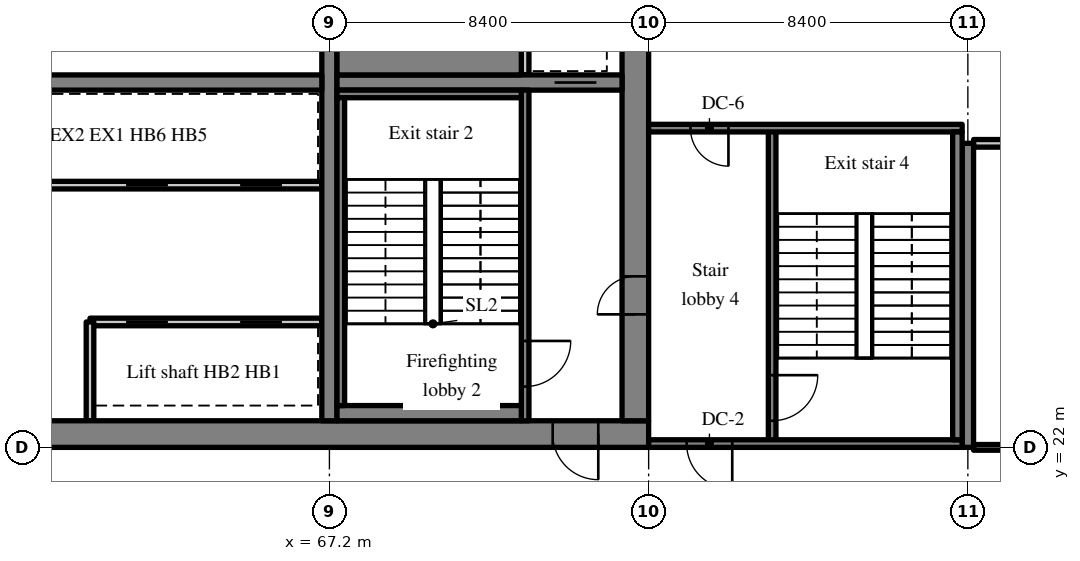
"""IFC4 building model, lengths in metres.
Left out: names, types, materials, properties, quantities, classifications, styles, units other than length and angle.
Written with IfcOpenShell. Run it as: python <this file> out.ifc"""

import sys

from ifc_helpers import new_model, si_unit, direction, frame, frame_2d, origin, place, context, subcontext, project, spatial, rectangle, extrude, source, transform, mapped, element, fill, save


model = new_model("IFC4")
c1 = context("Model", 3, precision=1e-05, world=origin(), true_north=direction((0.0, 1.0)))
c2 = subcontext(c1, "Body", "Model", "MODEL_VIEW")
j1 = project(units=[si_unit("LENGTHUNIT", "METRE"), si_unit("PLANEANGLEUNIT", "RADIAN")], contexts=[c1])
p1 = place(None, origin())
s1 = spatial("IfcSite", under=j1, at=p1, CompositionType="ELEMENT")
p2 = place(p1, origin())
s2 = spatial("IfcBuilding", under=s1, at=p2, CompositionType="ELEMENT")
p3 = place(p2, frame((0.0, 0.0, 155.4)))
s3 = spatial("IfcBuildingStorey", under=s2, at=p3, CompositionType="ELEMENT", Elevation=155.4)
m1 = source(origin(), c2, "Body", "SweptSolid", [
    extrude(rectangle(XDim=50.4, YDim=0.7, at=frame_2d((25.2, 0.0))), origin(), (0.0, 0.0, 1.0), 3.52),
])
p4 = place(p3, frame((25.2, 22.35, 0.0), z_axis=(0.0, 0.0, 1.0), x_axis=(1.0, 0.0, 0.0)))
e1 = element("IfcWall", 1, at=p4, inside=s3, PredefinedType="SHEAR", context=c2, shape_type="MappedRepresentation", body=[
    mapped(m1, transform((0.0, 0.0, 0.0), scale=1.0)),
])
m2 = source(origin(), c2, "Body", "SweptSolid", [
    extrude(rectangle(XDim=1.8, YDim=2.1, at=frame_2d((0.9, 1.05))), frame((0.0, 0.36, 0.0), z_axis=(0.0, -1.0, 0.0), x_axis=(1.0, 0.0, 0.0)), (0.0, 0.0, 1.0), 0.72),
])
p5 = place(p4, frame((15.9, 0.0, 0.0)))
e2 = element("IfcOpeningElement", 2, at=p5, cuts=e1, PredefinedType="OPENING", context=c2, shape_type="MappedRepresentation", body=[
    mapped(m2, transform((0.0, 0.0, 0.0), scale=1.0)),
])
m3 = source(origin(), c2, "Body", "SweptSolid", [
    extrude(rectangle(XDim=0.9, YDim=2.1, at=frame_2d((0.45, 1.05))), frame((0.0, 0.36, 0.0), z_axis=(0.0, -1.0, 0.0), x_axis=(1.0, 0.0, 0.0)), (0.0, 0.0, 1.0), 0.72),
])
p6 = place(p4, frame((21.5, 0.0, 0.0)))
e3 = element("IfcOpeningElement", 3, at=p6, cuts=e1, PredefinedType="OPENING", context=c2, shape_type="MappedRepresentation", body=[
    mapped(m3, transform((0.0, 0.0, 0.0), scale=1.0)),
])
p7 = place(p4, frame((32.7, 0.0, 0.0)))
e4 = element("IfcOpeningElement", 4, at=p7, cuts=e1, PredefinedType="OPENING", context=c2, shape_type="MappedRepresentation", body=[
    mapped(m2, transform((0.0, 0.0, 0.0), scale=1.0)),
])
m4 = source(origin(), c2, "Body", "SweptSolid", [
    extrude(rectangle(XDim=1.2, YDim=2.1, at=frame_2d((0.6, 1.05))), frame((0.0, 0.36, 0.0), z_axis=(0.0, -1.0, 0.0), x_axis=(1.0, 0.0, 0.0)), (0.0, 0.0, 1.0), 0.72),
])
p8 = place(p4, frame((6.475, 0.0, 0.0)))
e5 = element("IfcOpeningElement", 5, at=p8, cuts=e1, PredefinedType="OPENING", context=c2, shape_type="MappedRepresentation", body=[
    mapped(m4, transform((0.0, 0.0, 0.0), scale=1.0)),
])
p9 = place(p4, frame((47.875, 0.0, 0.0)))
e6 = element("IfcOpeningElement", 6, at=p9, cuts=e1, PredefinedType="OPENING", context=c2, shape_type="MappedRepresentation", body=[
    mapped(m4, transform((0.0, 0.0, 0.0), scale=1.0)),
])
m5 = source(origin(), c2, "Body", "SweptSolid", [
    extrude(rectangle(XDim=18.6, YDim=0.7, at=frame_2d((9.3, 0.0))), origin(), (0.0, 0.0, 1.0), 3.52),
])
p10 = place(p3, frame((75.25, 22.7, 0.0), z_axis=(0.0, 0.0, 1.0), x_axis=(0.0, 1.0, 0.0)))
e7 = element("IfcWall", 7, at=p10, inside=s3, PredefinedType="SHEAR", context=c2, shape_type="MappedRepresentation", body=[
    mapped(m5, transform((0.0, 0.0, 0.0), scale=1.0)),
])
m6 = source(origin(), c2, "Body", "SweptSolid", [
    extrude(rectangle(XDim=1.0, YDim=2.1, at=frame_2d((0.5, 1.05))), frame((0.0, 0.36, 0.0), z_axis=(0.0, -1.0, 0.0), x_axis=(1.0, 0.0, 0.0)), (0.0, 0.0, 1.0), 0.72),
])
p11 = place(p10, frame((2.8, 0.0, 0.0)))
e8 = element("IfcOpeningElement", 8, at=p11, cuts=e7, PredefinedType="OPENING", context=c2, shape_type="MappedRepresentation", body=[
    mapped(m6, transform((0.0, 0.0, 0.0), scale=1.0)),
])
p12 = place(p10, frame((12.7, 0.0, 0.0)))
e9 = element("IfcOpeningElement", 9, at=p12, cuts=e7, PredefinedType="OPENING", context=c2, shape_type="MappedRepresentation", body=[
    mapped(m4, transform((0.0, 0.0, 0.0), scale=1.0)),
])
m7 = source(origin(), c2, "Body", "SweptSolid", [
    extrude(rectangle(XDim=18.6, YDim=0.4, at=frame_2d((9.3, 0.0))), origin(), (0.0, 0.0, 1.0), 3.52),
])
p13 = place(p3, frame((67.2, 22.7, 0.0), z_axis=(0.0, 0.0, 1.0), x_axis=(0.0, 1.0, 0.0)))
e10 = element("IfcWall", 10, at=p13, inside=s3, PredefinedType="SHEAR", context=c2, shape_type="MappedRepresentation", body=[
    mapped(m7, transform((0.0, 0.0, 0.0), scale=1.0)),
])
m8 = source(origin(), c2, "Body", "SweptSolid", [
    extrude(rectangle(XDim=16.4, YDim=0.4, at=frame_2d((8.2, 0.0))), origin(), (0.0, 0.0, 1.0), 3.52),
])
p14 = place(p3, frame((50.6, 31.6, 0.0), z_axis=(0.0, 0.0, 1.0), x_axis=(1.0, 0.0, 0.0)))
e11 = element("IfcWall", 11, at=p14, inside=s3, PredefinedType="SHEAR", context=c2, shape_type="MappedRepresentation", body=[
    mapped(m8, transform((0.0, 0.0, 0.0), scale=1.0)),
])
m9 = source(origin(), c2, "Body", "SweptSolid", [
    extrude(rectangle(XDim=1.0, YDim=2.1, at=frame_2d((0.5, 1.05))), frame((0.0, 0.21, 0.0), z_axis=(0.0, -1.0, 0.0), x_axis=(1.0, 0.0, 0.0)), (0.0, 0.0, 1.0), 0.42),
])
p15 = place(p14, frame((0.6, 0.0, 0.0)))
e12 = element("IfcOpeningElement", 12, at=p15, cuts=e11, PredefinedType="OPENING", context=c2, shape_type="MappedRepresentation", body=[
    mapped(m9, transform((0.0, 0.0, 0.0), scale=1.0)),
])
m10 = source(origin(), c2, "Body", "SweptSolid", [
    extrude(rectangle(XDim=7.5, YDim=0.4, at=frame_2d((3.75, 0.0))), origin(), (0.0, 0.0, 1.0), 3.52),
])
p16 = place(p3, frame((67.4, 31.6, 0.0), z_axis=(0.0, 0.0, 1.0), x_axis=(1.0, 0.0, 0.0)))
e13 = element("IfcWall", 13, at=p16, inside=s3, PredefinedType="SHEAR", context=c2, shape_type="MappedRepresentation", body=[
    mapped(m10, transform((0.0, 0.0, 0.0), scale=1.0)),
])
m11 = source(origin(), c2, "Body", "SweptSolid", [
    extrude(rectangle(XDim=1.1, YDim=2.1, at=frame_2d((0.55, 1.05))), frame((0.0, 0.21, 0.0), z_axis=(0.0, -1.0, 0.0), x_axis=(1.0, 0.0, 0.0)), (0.0, 0.0, 1.0), 0.42),
])
p17 = place(p16, frame((5.725, 0.0, 0.0)))
e14 = element("IfcOpeningElement", 14, at=p17, cuts=e13, PredefinedType="OPENING", context=c2, shape_type="MappedRepresentation", body=[
    mapped(m11, transform((0.0, 0.0, 0.0), scale=1.0)),
])
m12 = source(origin(), c2, "Body", "SweptSolid", [
    extrude(rectangle(XDim=8.0, YDim=0.3, at=frame_2d((4.0, 0.0))), origin(), (0.0, 0.0, 1.0), 3.52),
])
p18 = place(p3, frame((84.0, 22.0, 0.0), z_axis=(0.0, 0.0, 1.0), x_axis=(0.0, 1.0, 0.0)))
e15 = element("IfcWall", 15, at=p18, inside=s3, PredefinedType="SHEAR", context=c2, shape_type="MappedRepresentation", body=[
    mapped(m12, transform((0.0, 0.0, 0.0), scale=1.0)),
])
m13 = source(origin(), c2, "Body", "SweptSolid", [
    extrude(rectangle(XDim=6.1, YDim=0.2, at=frame_2d((3.05, 0.0))), origin(), (0.0, 0.0, 1.0), 3.52),
])
p19 = place(p3, frame((67.0, 25.3, 0.0), z_axis=(0.0, 0.0, 1.0), x_axis=(-1.0, 0.0, 0.0)))
e16 = element("IfcWall", 16, at=p19, inside=s3, PredefinedType="SOLIDWALL", context=c2, shape_type="MappedRepresentation", body=[
    mapped(m13, transform((0.0, 0.0, 0.0), scale=1.0)),
])
m14 = source(origin(), c2, "Body", "SweptSolid", [
    extrude(rectangle(XDim=1.1, YDim=2.1, at=frame_2d((0.55, 1.05))), frame((0.0, 0.11, 0.0), z_axis=(0.0, -1.0, 0.0), x_axis=(1.0, 0.0, 0.0)), (0.0, 0.0, 1.0), 0.22),
])
p20 = place(p19, frame((1.05, 0.0, 0.0)))
e17 = element("IfcOpeningElement", 17, at=p20, cuts=e16, PredefinedType="OPENING", context=c2, shape_type="MappedRepresentation", body=[
    mapped(m14, transform((0.0, 0.0, 0.0), scale=1.0)),
])
p21 = place(p19, frame((4.05, 0.0, 0.0)))
e18 = element("IfcOpeningElement", 18, at=p21, cuts=e16, PredefinedType="OPENING", context=c2, shape_type="MappedRepresentation", body=[
    mapped(m14, transform((0.0, 0.0, 0.0), scale=1.0)),
])
m15 = source(origin(), c2, "Body", "SweptSolid", [
    extrude(rectangle(XDim=12.1, YDim=0.2, at=frame_2d((6.05, 0.0))), origin(), (0.0, 0.0, 1.0), 3.52),
])
p22 = place(p3, frame((67.0, 28.9, 0.0), z_axis=(0.0, 0.0, 1.0), x_axis=(-1.0, 0.0, 0.0)))
e19 = element("IfcWall", 19, at=p22, inside=s3, PredefinedType="SOLIDWALL", context=c2, shape_type="MappedRepresentation", body=[
    mapped(m15, transform((0.0, 0.0, 0.0), scale=1.0)),
])
p23 = place(p22, frame((1.05, 0.0, 0.0)))
e20 = element("IfcOpeningElement", 20, at=p23, cuts=e19, PredefinedType="OPENING", context=c2, shape_type="MappedRepresentation", body=[
    mapped(m14, transform((0.0, 0.0, 0.0), scale=1.0)),
])
p24 = place(p22, frame((4.05, 0.0, 0.0)))
e21 = element("IfcOpeningElement", 21, at=p24, cuts=e19, PredefinedType="OPENING", context=c2, shape_type="MappedRepresentation", body=[
    mapped(m14, transform((0.0, 0.0, 0.0), scale=1.0)),
])
m16 = source(origin(), c2, "Body", "SweptSolid", [
    extrude(rectangle(XDim=2.6, YDim=0.2, at=frame_2d((1.3, 0.0))), origin(), (0.0, 0.0, 1.0), 3.52),
])
p25 = place(p3, frame((60.9, 22.7, 0.0), z_axis=(0.0, 0.0, 1.0), x_axis=(0.0, 1.0, 0.0)))
e22 = element("IfcWall", 22, at=p25, inside=s3, PredefinedType="SOLIDWALL", context=c2, shape_type="MappedRepresentation", body=[
    mapped(m16, transform((0.0, 0.0, 0.0), scale=1.0)),
])
m17 = source(origin(), c2, "Body", "SweptSolid", [
    extrude(rectangle(XDim=8.7, YDim=0.2, at=frame_2d((4.35, 0.0))), origin(), (0.0, 0.0, 1.0), 3.52),
])
p26 = place(p3, frame((72.35, 22.7, 0.0), z_axis=(0.0, 0.0, 1.0), x_axis=(0.0, 1.0, 0.0)))
e23 = element("IfcWall", 23, at=p26, inside=s3, PredefinedType="SOLIDWALL", context=c2, shape_type="MappedRepresentation", body=[
    mapped(m17, transform((0.0, 0.0, 0.0), scale=1.0)),
])
m18 = source(origin(), c2, "Body", "SweptSolid", [
    extrude(rectangle(XDim=1.2, YDim=2.1, at=frame_2d((0.6, 1.05))), frame((0.0, 0.11, 0.0), z_axis=(0.0, -1.0, 0.0), x_axis=(1.0, 0.0, 0.0)), (0.0, 0.0, 1.0), 0.22),
])
p27 = place(p26, frame((0.9, 0.0, 0.0)))
e24 = element("IfcOpeningElement", 24, at=p27, cuts=e23, PredefinedType="OPENING", context=c2, shape_type="MappedRepresentation", body=[
    mapped(m18, transform((0.0, 0.0, 0.0), scale=1.0)),
])
m19 = source(origin(), c2, "Body", "SweptSolid", [
    extrude(rectangle(XDim=1.8, YDim=0.2, at=frame_2d((0.9, 0.0))), origin(), (0.0, 0.0, 1.0), 3.52),
])
p28 = place(p3, frame((72.35, 31.8, 0.0), z_axis=(0.0, 0.0, 1.0), x_axis=(0.0, 1.0, 0.0)))
e25 = element("IfcWall", 25, at=p28, inside=s3, PredefinedType="SOLIDWALL", context=c2, shape_type="MappedRepresentation", body=[
    mapped(m19, transform((0.0, 0.0, 0.0), scale=1.0)),
])
m20 = source(origin(), c2, "Body", "SweptSolid", [
    extrude(rectangle(XDim=8.3, YDim=0.2, at=frame_2d((4.15, 0.0))), origin(), (0.0, 0.0, 1.0), 3.52),
])
p29 = place(p3, frame((78.85, 22.1, 0.0), z_axis=(0.0, 0.0, 1.0), x_axis=(0.0, 1.0, 0.0)))
e26 = element("IfcWall", 26, at=p29, inside=s3, PredefinedType="SOLIDWALL", context=c2, shape_type="MappedRepresentation", body=[
    mapped(m20, transform((0.0, 0.0, 0.0), scale=1.0)),
])
p30 = place(p29, frame((0.6, 0.0, 0.0)))
e27 = element("IfcOpeningElement", 27, at=p30, cuts=e26, PredefinedType="OPENING", context=c2, shape_type="MappedRepresentation", body=[
    mapped(m18, transform((0.0, 0.0, 0.0), scale=1.0)),
])
m21 = source(origin(), c2, "Body", "SweptSolid", [
    extrude(rectangle(XDim=8.25, YDim=0.2, at=frame_2d((4.125, 0.0))), origin(), (0.0, 0.0, 1.0), 3.52),
])
p31 = place(p3, frame((83.85, 22.1, 0.0), z_axis=(0.0, 0.0, 1.0), x_axis=(-1.0, 0.0, 0.0)))
e28 = element("IfcWall", 28, at=p31, inside=s3, PredefinedType="SOLIDWALL", context=c2, shape_type="MappedRepresentation", body=[
    mapped(m21, transform((0.0, 0.0, 0.0), scale=1.0)),
])
p32 = place(p31, frame((6.05, 0.0, 0.0)))
e29 = element("IfcOpeningElement", 29, at=p32, cuts=e28, PredefinedType="OPENING", context=c2, shape_type="MappedRepresentation", body=[
    mapped(m18, transform((0.0, 0.0, 0.0), scale=1.0)),
])
p33 = place(p3, frame((83.85, 30.4, 0.0), z_axis=(0.0, 0.0, 1.0), x_axis=(-1.0, 0.0, 0.0)))
e30 = element("IfcWall", 30, at=p33, inside=s3, PredefinedType="SOLIDWALL", context=c2, shape_type="MappedRepresentation", body=[
    mapped(m21, transform((0.0, 0.0, 0.0), scale=1.0)),
])
m22 = source(origin(), c2, "Body", "SweptSolid", [
    extrude(rectangle(XDim=1.0, YDim=2.1, at=frame_2d((0.5, 1.05))), frame((0.0, 0.11, 0.0), z_axis=(0.0, -1.0, 0.0), x_axis=(1.0, 0.0, 0.0)), (0.0, 0.0, 1.0), 0.22),
])
p34 = place(p33, frame((6.15, 0.0, 0.0)))
e31 = element("IfcOpeningElement", 31, at=p34, cuts=e30, PredefinedType="OPENING", context=c2, shape_type="MappedRepresentation", body=[
    mapped(m22, transform((0.0, 0.0, 0.0), scale=1.0)),
])
m23 = source(origin(), c2, "Body", "SweptSolid", [
    extrude(rectangle(XDim=4.85, YDim=0.4, at=frame_2d((2.425, 0.0))), origin(), (0.0, 0.0, 1.0), 3.52),
])
p35 = place(p3, frame((67.4, 22.9, 0.0), z_axis=(0.0, 0.0, 1.0), x_axis=(1.0, 0.0, 0.0)))
e32 = element("IfcWall", 32, at=p35, inside=s3, PredefinedType="SOLIDWALL", context=c2, shape_type="MappedRepresentation", body=[
    mapped(m23, transform((0.0, 0.0, 0.0), scale=1.0)),
])
m24 = source(origin(), c2, "Body", "SweptSolid", [
    extrude(rectangle(XDim=4.85, YDim=0.2, at=frame_2d((2.425, 0.0))), origin(), (0.0, 0.0, 1.0), 3.52),
])
p36 = place(p3, frame((67.4, 31.3, 0.0), z_axis=(0.0, 0.0, 1.0), x_axis=(1.0, 0.0, 0.0)))
e33 = element("IfcWall", 33, at=p36, inside=s3, PredefinedType="SOLIDWALL", context=c2, shape_type="MappedRepresentation", body=[
    mapped(m24, transform((0.0, 0.0, 0.0), scale=1.0)),
])
m25 = source(origin(), c2, "Body", "SweptSolid", [
    extrude(rectangle(XDim=8.1, YDim=0.2, at=frame_2d((4.05, 0.0))), origin(), (0.0, 0.0, 1.0), 3.52),
])
p37 = place(p3, frame((67.5, 23.1, 0.0), z_axis=(0.0, 0.0, 1.0), x_axis=(0.0, 1.0, 0.0)))
e34 = element("IfcWall", 34, at=p37, inside=s3, PredefinedType="SOLIDWALL", context=c2, shape_type="MappedRepresentation", body=[
    mapped(m25, transform((0.0, 0.0, 0.0), scale=1.0)),
])
m26 = source(origin(), c2, "Body", "SweptSolid", [
    extrude(rectangle(XDim=4.85, YDim=1.0, at=frame_2d((2.425, 0.0))), origin(), (0.0, 0.0, 1.0), 3.52),
])
p38 = place(p3, frame((67.4, 32.3, 0.0), z_axis=(0.0, 0.0, 1.0), x_axis=(1.0, 0.0, 0.0)))
e35 = element("IfcWall", 35, at=p38, inside=s3, PredefinedType="SOLIDWALL", context=c2, shape_type="MappedRepresentation", body=[
    mapped(m26, transform((0.0, 0.0, 0.0), scale=1.0)),
])
m27 = source(origin(), c2, "Body", "SweptSolid", [
    extrude(rectangle(XDim=8.1, YDim=0.25, at=frame_2d((4.05, 0.0))), origin(), (0.0, 0.0, 1.0), 3.52),
])
p39 = place(p3, frame((83.725, 22.2, 0.0), z_axis=(0.0, 0.0, 1.0), x_axis=(0.0, 1.0, 0.0)))
e36 = element("IfcWall", 36, at=p39, inside=s3, PredefinedType="SOLIDWALL", context=c2, shape_type="MappedRepresentation", body=[
    mapped(m27, transform((0.0, 0.0, 0.0), scale=1.0)),
])
m28 = source(origin(), c2, "Body", "SweptSolid", [
    extrude(rectangle(XDim=7.95, YDim=0.15, at=frame_2d((3.975, 0.0))), origin(), (0.0, 0.0, 1.0), 2.82),
])
p40 = place(p3, frame((84.15, 22.0, 0.0), z_axis=(0.0, 0.0, 1.0), x_axis=(1.0, 0.0, 0.0)))
e37 = element("IfcWall", 37, at=p40, inside=s3, PredefinedType="PARTITIONING", context=c2, shape_type="MappedRepresentation", body=[
    mapped(m28, transform((0.0, 0.0, 0.0), scale=1.0)),
])
m29 = source(origin(), c2, "Body", "SweptSolid", [
    extrude(rectangle(XDim=1.8, YDim=2.1, at=frame_2d((0.9, 1.05))), frame((0.0, 0.085, 0.0), z_axis=(0.0, -1.0, 0.0), x_axis=(1.0, 0.0, 0.0)), (0.0, 0.0, 1.0), 0.17),
])
p41 = place(p40, frame((3.075, 0.0, 0.0)))
e38 = element("IfcOpeningElement", 38, at=p41, cuts=e37, PredefinedType="OPENING", context=c2, shape_type="MappedRepresentation", body=[
    mapped(m29, transform((0.0, 0.0, 0.0), scale=1.0)),
])
m30 = source(origin(), c2, "Body", "SweptSolid", [
    extrude(rectangle(XDim=7.95, YDim=0.2, at=frame_2d((3.975, 0.0))), origin(), (0.0, 0.0, 1.0), 3.52),
])
p42 = place(p3, frame((84.15, 30.0, 0.0), z_axis=(0.0, 0.0, 1.0), x_axis=(1.0, 0.0, 0.0)))
e39 = element("IfcWall", 39, at=p42, inside=s3, PredefinedType="PARTITIONING", context=c2, shape_type="MappedRepresentation", body=[
    mapped(m30, transform((0.0, 0.0, 0.0), scale=1.0)),
])
m31 = source(origin(), c2, "Body", "SweptSolid", [
    extrude(rectangle(XDim=1.1, YDim=2.1, at=frame_2d((0.55, 1.05))), frame((0.0, 0.025, 0.0), z_axis=(0.0, -1.0, 0.0), x_axis=(1.0, 0.0, 0.0)), (0.0, 0.0, 1.0), 0.05),
])
p43 = place(p20, origin())
e40 = element("IfcDoor", 40, at=p43, inside=s3, OperationType="SLIDING_TO_RIGHT", PredefinedType="DOOR", context=c2, shape_type="MappedRepresentation", body=[
    mapped(m31, transform((0.0, 0.0, 0.0), scale=1.0)),
])
fill(e17, e40)
p44 = place(p21, origin())
e41 = element("IfcDoor", 41, at=p44, inside=s3, OperationType="SLIDING_TO_LEFT", PredefinedType="DOOR", context=c2, shape_type="MappedRepresentation", body=[
    mapped(m31, transform((0.0, 0.0, 0.0), scale=1.0)),
])
fill(e18, e41)
p45 = place(p23, origin())
e42 = element("IfcDoor", 42, at=p45, inside=s3, OperationType="SLIDING_TO_RIGHT", PredefinedType="DOOR", context=c2, shape_type="MappedRepresentation", body=[
    mapped(m31, transform((0.0, 0.0, 0.0), scale=1.0)),
])
fill(e20, e42)
p46 = place(p24, origin())
e43 = element("IfcDoor", 43, at=p46, inside=s3, OperationType="SLIDING_TO_LEFT", PredefinedType="DOOR", context=c2, shape_type="MappedRepresentation", body=[
    mapped(m31, transform((0.0, 0.0, 0.0), scale=1.0)),
])
fill(e21, e43)
m32 = source(origin(), c2, "Body", "SweptSolid", [
    extrude(rectangle(XDim=1.2, YDim=2.1, at=frame_2d((0.6, 1.05))), frame((0.0, 0.025, 0.0), z_axis=(0.0, -1.0, 0.0), x_axis=(1.0, 0.0, 0.0)), (0.0, 0.0, 1.0), 0.05),
])
p47 = place(p27, origin())
e44 = element("IfcDoor", 44, at=p47, inside=s3, OperationType="SINGLE_SWING_RIGHT", PredefinedType="DOOR", context=c2, shape_type="MappedRepresentation", body=[
    mapped(m32, transform((0.0, 0.0, 0.0), scale=1.0)),
])
fill(e24, e44)
m33 = source(origin(), c2, "Body", "SweptSolid", [
    extrude(rectangle(XDim=1.2, YDim=2.1, at=frame_2d((0.6, 1.05))), frame((0.0, 0.275, 0.0), z_axis=(0.0, -1.0, 0.0), x_axis=(1.0, 0.0, 0.0)), (0.0, 0.0, 1.0), 0.05),
])
p48 = place(p9, origin())
e45 = element("IfcDoor", 45, at=p48, inside=s3, OperationType="SINGLE_SWING_RIGHT", PredefinedType="DOOR", context=c2, shape_type="MappedRepresentation", body=[
    mapped(m33, transform((0.0, 0.0, 0.0), scale=1.0)),
])
fill(e6, e45)
p49 = place(p17, origin())
e46 = element("IfcDoor", 46, at=p49, inside=s3, OperationType="SLIDING_TO_RIGHT", PredefinedType="DOOR", context=c2, shape_type="MappedRepresentation", body=[
    mapped(m31, transform((0.0, 0.0, 0.0), scale=1.0)),
])
fill(e14, e46)
m34 = source(origin(), c2, "Body", "SweptSolid", [
    extrude(rectangle(XDim=1.0, YDim=2.1, at=frame_2d((0.5, 1.05))), frame((0.0, 0.025, 0.0), z_axis=(0.0, -1.0, 0.0), x_axis=(1.0, 0.0, 0.0)), (0.0, 0.0, 1.0), 0.05),
])
p50 = place(p11, origin())
e47 = element("IfcDoor", 47, at=p50, inside=s3, OperationType="SINGLE_SWING_LEFT", PredefinedType="DOOR", context=c2, shape_type="MappedRepresentation", body=[
    mapped(m34, transform((0.0, 0.0, 0.0), scale=1.0)),
])
fill(e8, e47)
p51 = place(p30, origin())
e48 = element("IfcDoor", 48, at=p51, inside=s3, OperationType="SINGLE_SWING_RIGHT", PredefinedType="DOOR", context=c2, shape_type="MappedRepresentation", body=[
    mapped(m32, transform((0.0, 0.0, 0.0), scale=1.0)),
])
fill(e27, e48)
p52 = place(p32, origin())
e49 = element("IfcDoor", 49, at=p52, inside=s3, OperationType="SINGLE_SWING_LEFT", PredefinedType="DOOR", context=c2, shape_type="MappedRepresentation", body=[
    mapped(m32, transform((0.0, 0.0, 0.0), scale=1.0)),
])
fill(e29, e49)
p53 = place(p34, origin())
e50 = element("IfcDoor", 50, at=p53, inside=s3, OperationType="SINGLE_SWING_LEFT", PredefinedType="DOOR", context=c2, shape_type="MappedRepresentation", body=[
    mapped(m34, transform((0.0, 0.0, 0.0), scale=1.0)),
])
fill(e31, e50)
save(model, sys.argv[1])
